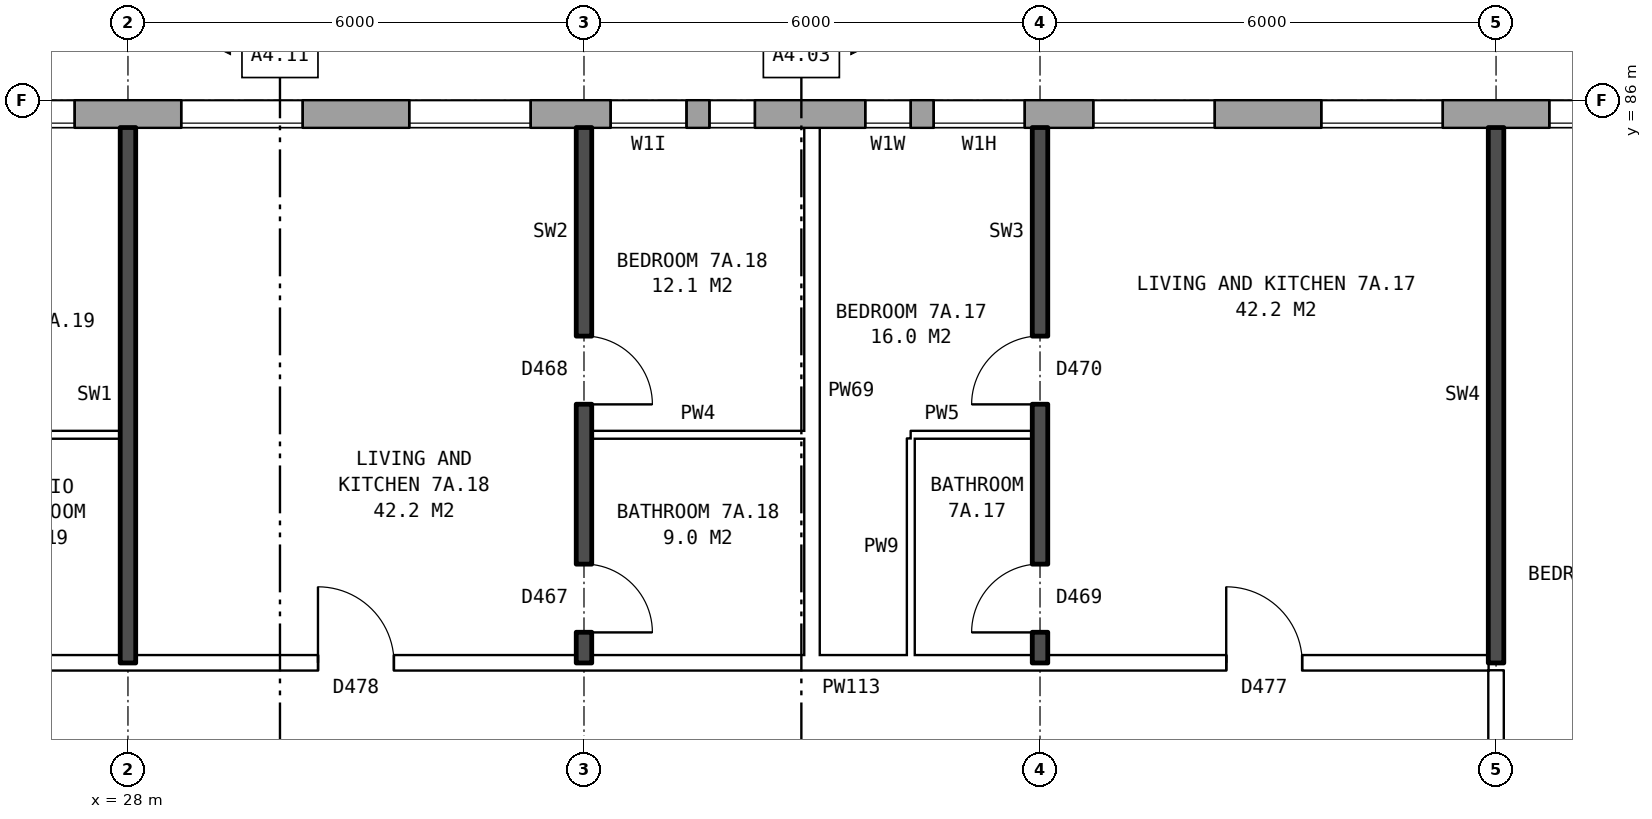
"""IFC4 building model, lengths in metres.
Left out: names, types, materials, properties, quantities, classifications, styles, units other than length and angle.
Written with IfcOpenShell. Run it as: python <this file> out.ifc"""

import sys

from ifc_helpers import new_model, si_unit, direction, frame, frame_2d, origin, place, context, subcontext, project, spatial, rectangle, extrude, element, fill, save


model = new_model("IFC4")
c1 = context("Model", 3, precision=1e-05, world=origin(), true_north=direction((0.0, 1.0)))
c2 = subcontext(c1, "Body", "Model", "MODEL_VIEW")
j1 = project(units=[si_unit("LENGTHUNIT", "METRE"), si_unit("PLANEANGLEUNIT", "RADIAN")], contexts=[c1])
p1 = place(None, origin())
s1 = spatial("IfcSite", under=j1, at=p1, CompositionType="ELEMENT")
p2 = place(p1, origin())
s2 = spatial("IfcBuilding", under=s1, at=p2, CompositionType="ELEMENT")
p3 = place(p2, frame((0.0, 0.0, 28.8)))
s3 = spatial("IfcBuildingStorey", under=s2, at=p3, CompositionType="ELEMENT", Elevation=28.8)
p4 = place(p3, frame((72.925, 85.82, 0.0), z_axis=(0.0, 0.0, 1.0), x_axis=(-1.0, 0.0, 0.0)))
e1 = element("IfcWall", 1, at=p4, inside=s3, PredefinedType="STANDARD", context=c2, shape_type="SweptSolid", body=[
    extrude(rectangle(XDim=50.101, YDim=0.36, at=frame_2d((25.05, 0.0))), origin(), (0.0, 0.0, 1.0), 2.85),
])
p5 = place(p4, frame((0.625, 0.0, 0.8)))
e2 = element("IfcOpeningElement", 2, at=p5, cuts=e1, PredefinedType="OPENING", context=c2, shape_type="SweptSolid", body=[
    extrude(rectangle(XDim=1.6, YDim=1.8, at=frame_2d((0.8, 0.9))), frame((0.0, 0.19, 0.0), z_axis=(0.0, -1.0, 0.0), x_axis=(1.0, 0.0, 0.0)), (0.0, 0.0, 1.0), 0.38),
])
p6 = place(p4, frame((3.625, 0.0, 0.8)))
e3 = element("IfcOpeningElement", 3, at=p6, cuts=e1, PredefinedType="OPENING", context=c2, shape_type="SweptSolid", body=[
    extrude(rectangle(XDim=1.6, YDim=1.8, at=frame_2d((0.8, 0.9))), frame((0.0, 0.19, 0.0), z_axis=(0.0, -1.0, 0.0), x_axis=(1.0, 0.0, 0.0)), (0.0, 0.0, 1.0), 0.38),
])
p7 = place(p4, frame((6.625, 0.0, 0.8)))
e4 = element("IfcOpeningElement", 4, at=p7, cuts=e1, PredefinedType="OPENING", context=c2, shape_type="SweptSolid", body=[
    extrude(rectangle(XDim=1.6, YDim=1.8, at=frame_2d((0.8, 0.9))), frame((0.0, 0.19, 0.0), z_axis=(0.0, -1.0, 0.0), x_axis=(1.0, 0.0, 0.0)), (0.0, 0.0, 1.0), 0.38),
])
p8 = place(p4, frame((9.625, 0.0, 0.8)))
e5 = element("IfcOpeningElement", 5, at=p8, cuts=e1, PredefinedType="OPENING", context=c2, shape_type="SweptSolid", body=[
    extrude(rectangle(XDim=1.6, YDim=1.8, at=frame_2d((0.8, 0.9))), frame((0.0, 0.19, 0.0), z_axis=(0.0, -1.0, 0.0), x_axis=(1.0, 0.0, 0.0)), (0.0, 0.0, 1.0), 0.38),
])
p9 = place(p4, frame((12.075, 0.0, 1.65)))
e6 = element("IfcOpeningElement", 6, at=p9, cuts=e1, PredefinedType="OPENING", context=c2, shape_type="SweptSolid", body=[
    extrude(rectangle(XDim=1.2, YDim=0.9, at=frame_2d((0.6, 0.45))), frame((0.0, 0.19, 0.0), z_axis=(0.0, -1.0, 0.0), x_axis=(1.0, 0.0, 0.0)), (0.0, 0.0, 1.0), 0.38),
])
p10 = place(p4, frame((15.325, 0.0, 0.8)))
e7 = element("IfcOpeningElement", 7, at=p10, cuts=e1, PredefinedType="OPENING", context=c2, shape_type="SweptSolid", body=[
    extrude(rectangle(XDim=0.6, YDim=1.2, at=frame_2d((0.3, 0.6))), frame((0.0, 0.19, 0.0), z_axis=(0.0, -1.0, 0.0), x_axis=(1.0, 0.0, 0.0)), (0.0, 0.0, 1.0), 0.38),
])
p11 = place(p4, frame((18.625, 0.0, 0.8)))
e8 = element("IfcOpeningElement", 8, at=p11, cuts=e1, PredefinedType="OPENING", context=c2, shape_type="SweptSolid", body=[
    extrude(rectangle(XDim=1.6, YDim=1.8, at=frame_2d((0.8, 0.9))), frame((0.0, 0.19, 0.0), z_axis=(0.0, -1.0, 0.0), x_axis=(1.0, 0.0, 0.0)), (0.0, 0.0, 1.0), 0.38),
])
p12 = place(p4, frame((21.625, 0.0, 0.8)))
e9 = element("IfcOpeningElement", 9, at=p12, cuts=e1, PredefinedType="OPENING", context=c2, shape_type="SweptSolid", body=[
    extrude(rectangle(XDim=1.6, YDim=1.8, at=frame_2d((0.8, 0.9))), frame((0.0, 0.19, 0.0), z_axis=(0.0, -1.0, 0.0), x_axis=(1.0, 0.0, 0.0)), (0.0, 0.0, 1.0), 0.38),
])
p13 = place(p4, frame((24.625, 0.0, 0.8)))
e10 = element("IfcOpeningElement", 10, at=p13, cuts=e1, PredefinedType="OPENING", context=c2, shape_type="SweptSolid", body=[
    extrude(rectangle(XDim=1.6, YDim=1.8, at=frame_2d((0.8, 0.9))), frame((0.0, 0.19, 0.0), z_axis=(0.0, -1.0, 0.0), x_axis=(1.0, 0.0, 0.0)), (0.0, 0.0, 1.0), 0.38),
])
p14 = place(p4, frame((27.625, 0.0, 0.8)))
e11 = element("IfcOpeningElement", 11, at=p14, cuts=e1, PredefinedType="OPENING", context=c2, shape_type="SweptSolid", body=[
    extrude(rectangle(XDim=1.6, YDim=1.8, at=frame_2d((0.8, 0.9))), frame((0.0, 0.19, 0.0), z_axis=(0.0, -1.0, 0.0), x_axis=(1.0, 0.0, 0.0)), (0.0, 0.0, 1.0), 0.38),
])
p15 = place(p4, frame((30.625, 0.0, 0.8)))
e12 = element("IfcOpeningElement", 12, at=p15, cuts=e1, PredefinedType="OPENING", context=c2, shape_type="SweptSolid", body=[
    extrude(rectangle(XDim=1.6, YDim=1.8, at=frame_2d((0.8, 0.9))), frame((0.0, 0.19, 0.0), z_axis=(0.0, -1.0, 0.0), x_axis=(1.0, 0.0, 0.0)), (0.0, 0.0, 1.0), 0.38),
])
p16 = place(p4, frame((33.125, 0.0, 0.8)))
e13 = element("IfcOpeningElement", 13, at=p16, cuts=e1, PredefinedType="OPENING", context=c2, shape_type="SweptSolid", body=[
    extrude(rectangle(XDim=1.2, YDim=1.5, at=frame_2d((0.6, 0.75))), frame((0.0, 0.19, 0.0), z_axis=(0.0, -1.0, 0.0), x_axis=(1.0, 0.0, 0.0)), (0.0, 0.0, 1.0), 0.38),
])
p17 = place(p4, frame((36.675, 0.0, 1.7)))
e14 = element("IfcOpeningElement", 14, at=p17, cuts=e1, PredefinedType="OPENING", context=c2, shape_type="SweptSolid", body=[
    extrude(rectangle(XDim=0.6, YDim=0.9, at=frame_2d((0.3, 0.45))), frame((0.0, 0.19, 0.0), z_axis=(0.0, -1.0, 0.0), x_axis=(1.0, 0.0, 0.0)), (0.0, 0.0, 1.0), 0.38),
])
p18 = place(p4, frame((39.625, 0.0, 0.8)))
e15 = element("IfcOpeningElement", 15, at=p18, cuts=e1, PredefinedType="OPENING", context=c2, shape_type="SweptSolid", body=[
    extrude(rectangle(XDim=1.6, YDim=1.8, at=frame_2d((0.8, 0.9))), frame((0.0, 0.19, 0.0), z_axis=(0.0, -1.0, 0.0), x_axis=(1.0, 0.0, 0.0)), (0.0, 0.0, 1.0), 0.38),
])
p19 = place(p4, frame((42.625, 0.0, 0.8)))
e16 = element("IfcOpeningElement", 16, at=p19, cuts=e1, PredefinedType="OPENING", context=c2, shape_type="SweptSolid", body=[
    extrude(rectangle(XDim=1.6, YDim=1.8, at=frame_2d((0.8, 0.9))), frame((0.0, 0.19, 0.0), z_axis=(0.0, -1.0, 0.0), x_axis=(1.0, 0.0, 0.0)), (0.0, 0.0, 1.0), 0.38),
])
p20 = place(p4, frame((45.625, 0.0, 0.8)))
e17 = element("IfcOpeningElement", 17, at=p20, cuts=e1, PredefinedType="OPENING", context=c2, shape_type="SweptSolid", body=[
    extrude(rectangle(XDim=1.6, YDim=1.8, at=frame_2d((0.8, 0.9))), frame((0.0, 0.19, 0.0), z_axis=(0.0, -1.0, 0.0), x_axis=(1.0, 0.0, 0.0)), (0.0, 0.0, 1.0), 0.38),
])
p21 = place(p4, frame((13.875, 0.0, 0.15)))
e18 = element("IfcOpeningElement", 18, at=p21, cuts=e1, PredefinedType="OPENING", context=c2, shape_type="SweptSolid", body=[
    extrude(rectangle(XDim=0.8, YDim=0.9, at=frame_2d((0.4, 0.45))), frame((0.0, 0.19, 0.0), z_axis=(0.0, -1.0, 0.0), x_axis=(1.0, 0.0, 0.0)), (0.0, 0.0, 1.0), 0.38),
])
p22 = place(p4, frame((16.225, 0.0, 0.8)))
e19 = element("IfcOpeningElement", 19, at=p22, cuts=e1, PredefinedType="OPENING", context=c2, shape_type="SweptSolid", body=[
    extrude(rectangle(XDim=1.4, YDim=1.8, at=frame_2d((0.7, 0.9))), frame((0.0, 0.19, 0.0), z_axis=(0.0, -1.0, 0.0), x_axis=(1.0, 0.0, 0.0)), (0.0, 0.0, 1.0), 0.38),
])
p23 = place(p4, frame((34.625, 0.0, 0.8)))
e20 = element("IfcOpeningElement", 20, at=p23, cuts=e1, PredefinedType="OPENING", context=c2, shape_type="SweptSolid", body=[
    extrude(rectangle(XDim=0.6, YDim=0.9, at=frame_2d((0.3, 0.45))), frame((0.0, 0.19, 0.0), z_axis=(0.0, -1.0, 0.0), x_axis=(1.0, 0.0, 0.0)), (0.0, 0.0, 1.0), 0.38),
])
p24 = place(p4, frame((37.575, 0.0, 1.1)))
e21 = element("IfcOpeningElement", 21, at=p24, cuts=e1, PredefinedType="OPENING", context=c2, shape_type="SweptSolid", body=[
    extrude(rectangle(XDim=1.0, YDim=1.5, at=frame_2d((0.5, 0.75))), frame((0.0, 0.19, 0.0), z_axis=(0.0, -1.0, 0.0), x_axis=(1.0, 0.0, 0.0)), (0.0, 0.0, 1.0), 0.38),
])
p25 = place(p3, frame((20.11, 78.6, 0.0), z_axis=(0.0, 0.0, 1.0), x_axis=(1.0, 0.0, 0.0)))
e22 = element("IfcWall", 22, at=p25, inside=s3, PredefinedType="PARTITIONING", context=c2, shape_type="SweptSolid", body=[
    extrude(rectangle(XDim=25.79, YDim=0.2, at=frame_2d((12.895, 0.0))), origin(), (0.0, 0.0, 1.0), 2.85),
])
p26 = place(p25, frame((22.34, 0.0, 0.0)))
e23 = element("IfcOpeningElement", 23, at=p26, cuts=e22, PredefinedType="OPENING", context=c2, shape_type="SweptSolid", body=[
    extrude(rectangle(XDim=1.0, YDim=2.1, at=frame_2d((0.5, 1.05))), frame((0.0, 0.11, 0.0), z_axis=(0.0, -1.0, 0.0), x_axis=(1.0, 0.0, 0.0)), (0.0, 0.0, 1.0), 0.22),
])
p27 = place(p25, frame((10.39, 0.0, 0.0)))
e24 = element("IfcOpeningElement", 24, at=p27, cuts=e22, PredefinedType="OPENING", context=c2, shape_type="SweptSolid", body=[
    extrude(rectangle(XDim=1.0, YDim=2.1, at=frame_2d((0.5, 1.05))), frame((0.0, 0.11, 0.0), z_axis=(0.0, -1.0, 0.0), x_axis=(1.0, 0.0, 0.0)), (0.0, 0.0, 1.0), 0.22),
])
p28 = place(p25, frame((2.245, 0.0, 0.0)))
e25 = element("IfcOpeningElement", 25, at=p28, cuts=e22, PredefinedType="OPENING", context=c2, shape_type="SweptSolid", body=[
    extrude(rectangle(XDim=1.0, YDim=2.1, at=frame_2d((0.5, 1.05))), frame((0.0, 0.11, 0.0), z_axis=(0.0, -1.0, 0.0), x_axis=(1.0, 0.0, 0.0)), (0.0, 0.0, 1.0), 0.22),
])
p29 = place(p3, frame((25.6, 81.6, 0.0), z_axis=(0.0, 0.0, 1.0), x_axis=(1.0, 0.0, 0.0)))
e26 = element("IfcWall", 26, at=p29, inside=s3, PredefinedType="PARTITIONING", context=c2, shape_type="SweptSolid", body=[
    extrude(rectangle(XDim=2.3, YDim=0.1, at=frame_2d((1.15, 0.0))), origin(), (0.0, 0.0, 1.0), 2.85),
])
p30 = place(p3, frame((34.1, 81.6, 0.0), z_axis=(0.0, 0.0, 1.0), x_axis=(1.0, 0.0, 0.0)))
e27 = element("IfcWall", 27, at=p30, inside=s3, PredefinedType="PARTITIONING", context=c2, shape_type="SweptSolid", body=[
    extrude(rectangle(XDim=2.8, YDim=0.1, at=frame_2d((1.4, 0.0))), origin(), (0.0, 0.0, 1.0), 2.85),
])
p31 = place(p3, frame((38.3, 81.6, 0.0), z_axis=(0.0, 0.0, 1.0), x_axis=(1.0, 0.0, 0.0)))
e28 = element("IfcWall", 28, at=p31, inside=s3, PredefinedType="PARTITIONING", context=c2, shape_type="SweptSolid", body=[
    extrude(rectangle(XDim=1.6, YDim=0.1, at=frame_2d((0.8, 0.0))), origin(), (0.0, 0.0, 1.0), 2.85),
])
p32 = place(p3, frame((28.0, 78.6, 0.0), z_axis=(0.0, 0.0, 1.0), x_axis=(0.0, 1.0, 0.0)))
e29 = element("IfcWall", 29, at=p32, inside=s3, PredefinedType="SOLIDWALL", context=c2, shape_type="SweptSolid", body=[
    extrude(rectangle(XDim=7.04, YDim=0.2, at=frame_2d((3.52, 0.0))), origin(), (0.0, 0.0, 1.0), 2.85),
])
p33 = place(p3, frame((34.0, 78.6, 0.0), z_axis=(0.0, 0.0, 1.0), x_axis=(0.0, 1.0, 0.0)))
e30 = element("IfcWall", 30, at=p33, inside=s3, PredefinedType="SOLIDWALL", context=c2, shape_type="SweptSolid", body=[
    extrude(rectangle(XDim=7.04, YDim=0.2, at=frame_2d((3.52, 0.0))), origin(), (0.0, 0.0, 1.0), 2.85),
])
p34 = place(p33, frame((3.4, 0.0, 0.0)))
e31 = element("IfcOpeningElement", 31, at=p34, cuts=e30, PredefinedType="OPENING", context=c2, shape_type="SweptSolid", body=[
    extrude(rectangle(XDim=0.9, YDim=2.1, at=frame_2d((0.45, 1.05))), frame((0.0, 0.11, 0.0), z_axis=(0.0, -1.0, 0.0), x_axis=(1.0, 0.0, 0.0)), (0.0, 0.0, 1.0), 0.22),
])
p35 = place(p33, frame((0.4, 0.0, 0.0)))
e32 = element("IfcOpeningElement", 32, at=p35, cuts=e30, PredefinedType="OPENING", context=c2, shape_type="SweptSolid", body=[
    extrude(rectangle(XDim=0.9, YDim=2.1, at=frame_2d((0.45, 1.05))), frame((0.0, 0.11, 0.0), z_axis=(0.0, -1.0, 0.0), x_axis=(1.0, 0.0, 0.0)), (0.0, 0.0, 1.0), 0.22),
])
p36 = place(p3, frame((37.0, 78.7, 0.0), z_axis=(0.0, 0.0, 1.0), x_axis=(0.0, 1.0, 0.0)))
e33 = element("IfcWall", 33, at=p36, inside=s3, PredefinedType="PARTITIONING", context=c2, shape_type="SweptSolid", body=[
    extrude(rectangle(XDim=6.94, YDim=0.2, at=frame_2d((3.47, 0.0))), origin(), (0.0, 0.0, 1.0), 2.85),
])
p37 = place(p3, frame((38.3, 78.7, 0.0), z_axis=(0.0, 0.0, 1.0), x_axis=(0.0, 1.0, 0.0)))
e34 = element("IfcWall", 34, at=p37, inside=s3, PredefinedType="PARTITIONING", context=c2, shape_type="SweptSolid", body=[
    extrude(rectangle(XDim=2.85, YDim=0.1, at=frame_2d((1.425, 0.0))), origin(), (0.0, 0.0, 1.0), 2.85),
])
p38 = place(p3, frame((40.0, 78.6, 0.0), z_axis=(0.0, 0.0, 1.0), x_axis=(0.0, 1.0, 0.0)))
e35 = element("IfcWall", 35, at=p38, inside=s3, PredefinedType="SOLIDWALL", context=c2, shape_type="SweptSolid", body=[
    extrude(rectangle(XDim=7.04, YDim=0.2, at=frame_2d((3.52, 0.0))), origin(), (0.0, 0.0, 1.0), 2.85),
])
p39 = place(p38, frame((3.4, 0.0, 0.0)))
e36 = element("IfcOpeningElement", 36, at=p39, cuts=e35, PredefinedType="OPENING", context=c2, shape_type="SweptSolid", body=[
    extrude(rectangle(XDim=0.9, YDim=2.1, at=frame_2d((0.45, 1.05))), frame((0.0, 0.11, 0.0), z_axis=(0.0, -1.0, 0.0), x_axis=(1.0, 0.0, 0.0)), (0.0, 0.0, 1.0), 0.22),
])
p40 = place(p38, frame((0.4, 0.0, 0.0)))
e37 = element("IfcOpeningElement", 37, at=p40, cuts=e35, PredefinedType="OPENING", context=c2, shape_type="SweptSolid", body=[
    extrude(rectangle(XDim=0.9, YDim=2.1, at=frame_2d((0.45, 1.05))), frame((0.0, 0.11, 0.0), z_axis=(0.0, -1.0, 0.0), x_axis=(1.0, 0.0, 0.0)), (0.0, 0.0, 1.0), 0.22),
])
p41 = place(p3, frame((46.0, 76.3, 0.0), z_axis=(0.0, 0.0, 1.0), x_axis=(0.0, 1.0, 0.0)))
e38 = element("IfcWall", 38, at=p41, inside=s3, PredefinedType="PARTITIONING", context=c2, shape_type="SweptSolid", body=[
    extrude(rectangle(XDim=2.2, YDim=0.2, at=frame_2d((1.1, 0.0))), origin(), (0.0, 0.0, 1.0), 2.85),
])
p42 = place(p3, frame((46.0, 78.6, 0.0), z_axis=(0.0, 0.0, 1.0), x_axis=(0.0, 1.0, 0.0)))
e39 = element("IfcWall", 39, at=p42, inside=s3, PredefinedType="SOLIDWALL", context=c2, shape_type="SweptSolid", body=[
    extrude(rectangle(XDim=7.04, YDim=0.2, at=frame_2d((3.52, 0.0))), origin(), (0.0, 0.0, 1.0), 2.85),
])
p43 = place(p13, origin())
e40 = element("IfcWindow", 40, at=p43, inside=s3, PartitioningType="SINGLE_PANEL", PredefinedType="WINDOW", context=c2, shape_type="SweptSolid", body=[
    extrude(rectangle(XDim=1.6, YDim=1.8, at=frame_2d((0.8, 0.9))), frame((0.0, 0.15, 0.0), z_axis=(0.0, -1.0, 0.0), x_axis=(1.0, 0.0, 0.0)), (0.0, 0.0, 1.0), 0.06),
])
fill(e10, e40)
p44 = place(p14, origin())
e41 = element("IfcWindow", 41, at=p44, inside=s3, PartitioningType="SINGLE_PANEL", PredefinedType="WINDOW", context=c2, shape_type="SweptSolid", body=[
    extrude(rectangle(XDim=1.6, YDim=1.8, at=frame_2d((0.8, 0.9))), frame((0.0, 0.15, 0.0), z_axis=(0.0, -1.0, 0.0), x_axis=(1.0, 0.0, 0.0)), (0.0, 0.0, 1.0), 0.06),
])
fill(e11, e41)
p45 = place(p15, origin())
e42 = element("IfcWindow", 42, at=p45, inside=s3, PartitioningType="SINGLE_PANEL", PredefinedType="WINDOW", context=c2, shape_type="SweptSolid", body=[
    extrude(rectangle(XDim=1.6, YDim=1.8, at=frame_2d((0.8, 0.9))), frame((0.0, 0.15, 0.0), z_axis=(0.0, -1.0, 0.0), x_axis=(1.0, 0.0, 0.0)), (0.0, 0.0, 1.0), 0.06),
])
fill(e12, e42)
p46 = place(p16, origin())
e43 = element("IfcWindow", 43, at=p46, inside=s3, PartitioningType="SINGLE_PANEL", PredefinedType="WINDOW", context=c2, shape_type="SweptSolid", body=[
    extrude(rectangle(XDim=1.2, YDim=1.5, at=frame_2d((0.6, 0.75))), frame((0.0, 0.15, 0.0), z_axis=(0.0, -1.0, 0.0), x_axis=(1.0, 0.0, 0.0)), (0.0, 0.0, 1.0), 0.06),
])
fill(e13, e43)
p47 = place(p17, origin())
e44 = element("IfcWindow", 44, at=p47, inside=s3, PartitioningType="SINGLE_PANEL", PredefinedType="WINDOW", context=c2, shape_type="SweptSolid", body=[
    extrude(rectangle(XDim=0.6, YDim=0.9, at=frame_2d((0.3, 0.45))), frame((0.0, 0.15, 0.0), z_axis=(0.0, -1.0, 0.0), x_axis=(1.0, 0.0, 0.0)), (0.0, 0.0, 1.0), 0.06),
])
fill(e14, e44)
p48 = place(p18, origin())
e45 = element("IfcWindow", 45, at=p48, inside=s3, PartitioningType="SINGLE_PANEL", PredefinedType="WINDOW", context=c2, shape_type="SweptSolid", body=[
    extrude(rectangle(XDim=1.6, YDim=1.8, at=frame_2d((0.8, 0.9))), frame((0.0, 0.15, 0.0), z_axis=(0.0, -1.0, 0.0), x_axis=(1.0, 0.0, 0.0)), (0.0, 0.0, 1.0), 0.06),
])
fill(e15, e45)
p49 = place(p19, origin())
e46 = element("IfcWindow", 46, at=p49, inside=s3, PartitioningType="SINGLE_PANEL", PredefinedType="WINDOW", context=c2, shape_type="SweptSolid", body=[
    extrude(rectangle(XDim=1.6, YDim=1.8, at=frame_2d((0.8, 0.9))), frame((0.0, 0.15, 0.0), z_axis=(0.0, -1.0, 0.0), x_axis=(1.0, 0.0, 0.0)), (0.0, 0.0, 1.0), 0.06),
])
fill(e16, e46)
p50 = place(p20, origin())
e47 = element("IfcWindow", 47, at=p50, inside=s3, PartitioningType="SINGLE_PANEL", PredefinedType="WINDOW", context=c2, shape_type="SweptSolid", body=[
    extrude(rectangle(XDim=1.6, YDim=1.8, at=frame_2d((0.8, 0.9))), frame((0.0, 0.15, 0.0), z_axis=(0.0, -1.0, 0.0), x_axis=(1.0, 0.0, 0.0)), (0.0, 0.0, 1.0), 0.06),
])
fill(e17, e47)
p51 = place(p39, origin())
e48 = element("IfcDoor", 48, at=p51, inside=s3, OperationType="SINGLE_SWING_LEFT", PredefinedType="DOOR", context=c2, shape_type="SweptSolid", body=[
    extrude(rectangle(XDim=0.9, YDim=2.1, at=frame_2d((0.45, 1.05))), frame((0.0, 0.025, 0.0), z_axis=(0.0, -1.0, 0.0), x_axis=(1.0, 0.0, 0.0)), (0.0, 0.0, 1.0), 0.05),
])
fill(e36, e48)
p52 = place(p26, origin())
e49 = element("IfcDoor", 49, at=p52, inside=s3, OperationType="SINGLE_SWING_LEFT", PredefinedType="DOOR", context=c2, shape_type="SweptSolid", body=[
    extrude(rectangle(XDim=1.0, YDim=2.1, at=frame_2d((0.5, 1.05))), frame((0.0, 0.025, 0.0), z_axis=(0.0, -1.0, 0.0), x_axis=(1.0, 0.0, 0.0)), (0.0, 0.0, 1.0), 0.05),
])
fill(e23, e49)
p53 = place(p40, origin())
e50 = element("IfcDoor", 50, at=p53, inside=s3, OperationType="SINGLE_SWING_LEFT", PredefinedType="DOOR", context=c2, shape_type="SweptSolid", body=[
    extrude(rectangle(XDim=0.9, YDim=2.1, at=frame_2d((0.45, 1.05))), frame((0.0, 0.025, 0.0), z_axis=(0.0, -1.0, 0.0), x_axis=(1.0, 0.0, 0.0)), (0.0, 0.0, 1.0), 0.05),
])
fill(e37, e50)
p54 = place(p34, frame((0.9, 0.0, 0.0), z_axis=(0.0, 0.0, 1.0), x_axis=(-1.0, 0.0, 0.0)))
e51 = element("IfcDoor", 51, at=p54, inside=s3, OperationType="SINGLE_SWING_RIGHT", PredefinedType="DOOR", context=c2, shape_type="SweptSolid", body=[
    extrude(rectangle(XDim=0.9, YDim=2.1, at=frame_2d((0.45, 1.05))), frame((0.0, 0.025, 0.0), z_axis=(0.0, -1.0, 0.0), x_axis=(1.0, 0.0, 0.0)), (0.0, 0.0, 1.0), 0.05),
])
fill(e31, e51)
p55 = place(p27, origin())
e52 = element("IfcDoor", 52, at=p55, inside=s3, OperationType="SINGLE_SWING_LEFT", PredefinedType="DOOR", context=c2, shape_type="SweptSolid", body=[
    extrude(rectangle(XDim=1.0, YDim=2.1, at=frame_2d((0.5, 1.05))), frame((0.0, 0.025, 0.0), z_axis=(0.0, -1.0, 0.0), x_axis=(1.0, 0.0, 0.0)), (0.0, 0.0, 1.0), 0.05),
])
fill(e24, e52)
p56 = place(p35, frame((0.9, 0.0, 0.0), z_axis=(0.0, 0.0, 1.0), x_axis=(-1.0, 0.0, 0.0)))
e53 = element("IfcDoor", 53, at=p56, inside=s3, OperationType="SINGLE_SWING_RIGHT", PredefinedType="DOOR", context=c2, shape_type="SweptSolid", body=[
    extrude(rectangle(XDim=0.9, YDim=2.1, at=frame_2d((0.45, 1.05))), frame((0.0, 0.025, 0.0), z_axis=(0.0, -1.0, 0.0), x_axis=(1.0, 0.0, 0.0)), (0.0, 0.0, 1.0), 0.05),
])
fill(e32, e53)
p57 = place(p23, origin())
e54 = element("IfcWindow", 54, at=p57, inside=s3, PartitioningType="SINGLE_PANEL", PredefinedType="WINDOW", context=c2, shape_type="SweptSolid", body=[
    extrude(rectangle(XDim=0.6, YDim=0.9, at=frame_2d((0.3, 0.45))), frame((0.0, 0.15, 0.0), z_axis=(0.0, -1.0, 0.0), x_axis=(1.0, 0.0, 0.0)), (0.0, 0.0, 1.0), 0.06),
])
fill(e20, e54)
p58 = place(p24, origin())
e55 = element("IfcWindow", 55, at=p58, inside=s3, PartitioningType="SINGLE_PANEL", PredefinedType="WINDOW", context=c2, shape_type="SweptSolid", body=[
    extrude(rectangle(XDim=1.0, YDim=1.5, at=frame_2d((0.5, 0.75))), frame((0.0, 0.15, 0.0), z_axis=(0.0, -1.0, 0.0), x_axis=(1.0, 0.0, 0.0)), (0.0, 0.0, 1.0), 0.06),
])
fill(e21, e55)
save(model, sys.argv[1])
